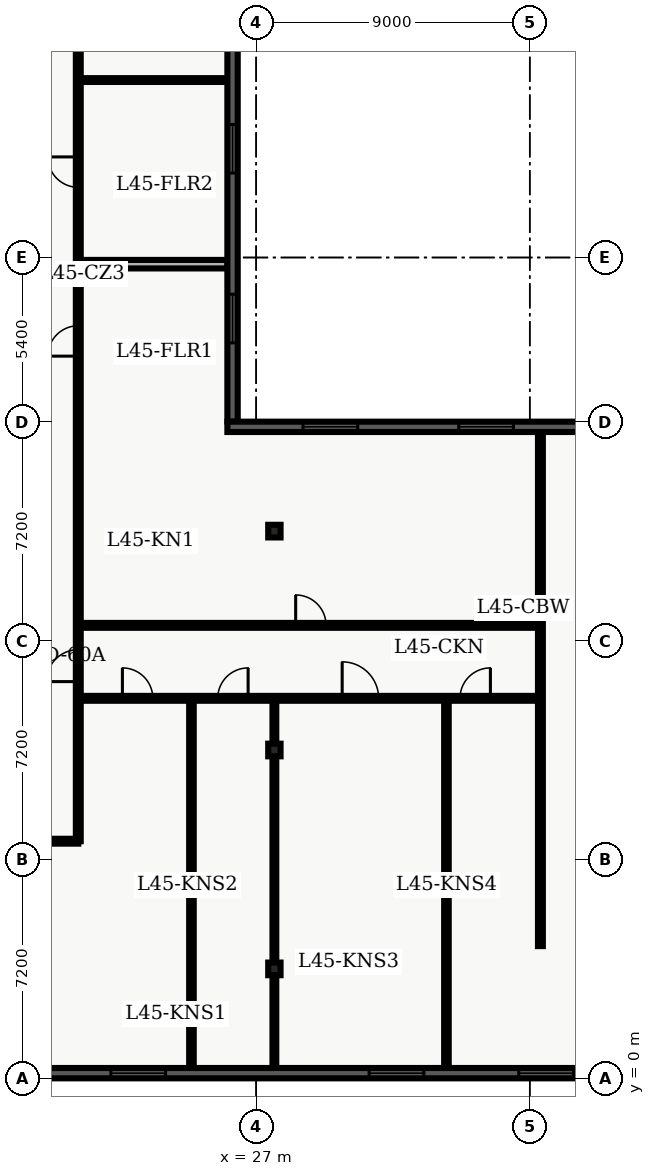
"""IFC4 building model, lengths in metres.
Left out: names, types, materials, properties, quantities, classifications, styles, units other than length and angle.
Written with IfcOpenShell. Run it as: python <this file> out.ifc"""

import sys

from ifc_helpers import new_model, entity, si_unit, converted_unit, direction, frame, origin_with_axes, origin_2d_with_axis, place, context, subcontext, project, spatial, polyline, rectangle, i_section, outline, extrude, element, fill, save


model = new_model("IFC4")
c1 = context("Model", 3, precision=1e-05, world=origin_with_axes(), true_north=direction((0.0, 1.0)))
c2 = subcontext(c1, "Body", "Model", "MODEL_VIEW")
j1 = project(units=[si_unit("LENGTHUNIT", "METRE"), converted_unit("PLANEANGLEUNIT", "DEGREE", entity("IfcPlaneAngleMeasure", 0.017), si_unit("PLANEANGLEUNIT", "RADIAN"), dimensions=[0, 0, 0, 0, 0, 0, 0])], contexts=[c1])
p1 = place(None, origin_with_axes())
s1 = spatial("IfcSite", under=j1, at=p1, CompositionType="ELEMENT")
p2 = place(p1, origin_with_axes())
s2 = spatial("IfcBuilding", under=s1, at=p2, CompositionType="ELEMENT")
p3 = place(p2, frame((0.0, 0.0, 183.6), z_axis=(0.0, 0.0, 1.0), x_axis=(1.0, 0.0, 0.0)))
s3 = spatial("IfcBuildingStorey", under=s2, at=p3, CompositionType="ELEMENT", Elevation=183.6)
for number, where, z_axis, x_axis in (
    (1, (27.6, 3.6, 0.0), (0.0, 0.0, 1.0), (1.0, 0.0, 0.0)),
    (2, (27.6, 10.8, 0.0), (0.0, 0.0, 1.0), (1.0, 0.0, 0.0)),
    (3, (27.6, 18.0, 0.0), (0.0, 0.0, 1.0), (1.0, 0.0, 0.0)),
):
    element("IfcColumn", number, at=place(p3, frame(where, z_axis=z_axis, x_axis=x_axis)), inside=s3, PredefinedType="COLUMN", context=c2, shape_type="SweptSolid", body=[
        extrude(i_section(OverallWidth=0.406, OverallDepth=0.416, WebThickness=0.03, FlangeThickness=0.048, FilletRadius=0.022, at=origin_2d_with_axis()), origin_with_axes(), (0.0, 0.0, 1.0), 3.9),
    ])
p4 = place(p3, frame((2.6, 7.8, 0.0), z_axis=(0.0, 0.0, 1.0), x_axis=(1.0, 0.0, 0.0)))
e4 = element("IfcWall", 4, at=p4, inside=s3, PredefinedType="PARTITIONING", context=c2, shape_type="SweptSolid", body=[
    extrude(outline(polyline([(0.0, -0.08), (18.55, -0.08), (18.55, 0.08), (0.0, 0.08), (0.0, -0.08)])), origin_with_axes(), (0.0, 0.0, 1.0), 2.64),
])
p5 = place(p4, frame((2.569, 0.0, 0.0), z_axis=(0.0, 0.0, 1.0), x_axis=(1.0, 0.0, 0.0)))
e5 = element("IfcOpeningElement", 5, at=p5, cuts=e4, PredefinedType="OPENING", context=c2, shape_type="SweptSolid", body=[
    extrude(rectangle(XDim=1.0, YDim=0.18, at=origin_2d_with_axis()), origin_with_axes(), (0.0, 0.0, 1.0), 2.15),
])
p6 = place(p4, frame((7.534, 0.0, 0.0), z_axis=(0.0, 0.0, 1.0), x_axis=(1.0, 0.0, 0.0)))
e6 = element("IfcOpeningElement", 6, at=p6, cuts=e4, PredefinedType="OPENING", context=c2, shape_type="SweptSolid", body=[
    extrude(rectangle(XDim=1.0, YDim=0.18, at=origin_2d_with_axis()), origin_with_axes(), (0.0, 0.0, 1.0), 2.15),
])
p7 = place(p4, frame((11.293, 0.0, 0.0), z_axis=(0.0, 0.0, 1.0), x_axis=(1.0, 0.0, 0.0)))
e7 = element("IfcOpeningElement", 7, at=p7, cuts=e4, PredefinedType="OPENING", context=c2, shape_type="SweptSolid", body=[
    extrude(rectangle(XDim=1.0, YDim=0.18, at=origin_2d_with_axis()), origin_with_axes(), (0.0, 0.0, 1.0), 2.15),
])
p8 = place(p4, frame((16.142, 0.0, 0.0), z_axis=(0.0, 0.0, 1.0), x_axis=(1.0, 0.0, 0.0)))
e8 = element("IfcOpeningElement", 8, at=p8, cuts=e4, PredefinedType="OPENING", context=c2, shape_type="SweptSolid", body=[
    extrude(rectangle(XDim=1.0, YDim=0.18, at=origin_2d_with_axis()), origin_with_axes(), (0.0, 0.0, 1.0), 2.15),
])
p9 = place(p3, frame((21.15, 7.8, 0.0), z_axis=(0.0, 0.0, 1.0), x_axis=(0.0, 1.0, 0.0)))
e9 = element("IfcWall", 9, at=p9, inside=s3, PredefinedType="PARTITIONING", context=c2, shape_type="SweptSolid", body=[
    extrude(outline(polyline([(0.0, -0.08), (32.7, -0.08), (32.7, 0.08), (0.0, 0.08), (0.0, -0.08)])), origin_with_axes(), (0.0, 0.0, 1.0), 2.64),
])
p10 = place(p9, frame((16.456, 0.0, 0.0), z_axis=(0.0, 0.0, 1.0), x_axis=(1.0, 0.0, 0.0)))
e10 = element("IfcOpeningElement", 10, at=p10, cuts=e9, PredefinedType="OPENING", context=c2, shape_type="SweptSolid", body=[
    extrude(rectangle(XDim=1.0, YDim=0.18, at=origin_2d_with_axis()), origin_with_axes(), (0.0, 0.0, 1.0), 2.15),
])
p11 = place(p9, frame((22.009, 0.0, 0.0), z_axis=(0.0, 0.0, 1.0), x_axis=(1.0, 0.0, 0.0)))
e11 = element("IfcOpeningElement", 11, at=p11, cuts=e9, PredefinedType="OPENING", context=c2, shape_type="SweptSolid", body=[
    extrude(rectangle(XDim=1.0, YDim=0.18, at=origin_2d_with_axis()), origin_with_axes(), (0.0, 0.0, 1.0), 2.15),
])
p12 = place(p9, frame((28.803, 0.0, 0.0), z_axis=(0.0, 0.0, 1.0), x_axis=(1.0, 0.0, 0.0)))
e12 = element("IfcOpeningElement", 12, at=p12, cuts=e9, PredefinedType="OPENING", context=c2, shape_type="SweptSolid", body=[
    extrude(rectangle(XDim=1.0, YDim=0.18, at=origin_2d_with_axis()), origin_with_axes(), (0.0, 0.0, 1.0), 2.15),
])
p13 = place(p9, frame((5.775, 0.0, 0.0), z_axis=(0.0, 0.0, 1.0), x_axis=(1.0, 0.0, 0.0)))
e13 = element("IfcOpeningElement", 13, at=p13, cuts=e9, PredefinedType="OPENING", context=c2, shape_type="SweptSolid", body=[
    extrude(rectangle(XDim=1.05, YDim=0.18, at=origin_2d_with_axis()), origin_with_axes(), (0.0, 0.0, 1.0), 2.15),
])
p14 = place(p3, frame((21.3, 26.781, 0.0), z_axis=(0.0, 0.0, 1.0), x_axis=(1.0, 0.0, 0.0)))
e14 = element("IfcWall", 14, at=p14, inside=s3, PredefinedType="PARTITIONING", context=c2, shape_type="SweptSolid", body=[
    extrude(outline(polyline([(0.0, -0.14), (4.759, -0.14), (4.759, 0.14), (0.0, 0.14), (0.0, -0.14)])), origin_with_axes(), (0.0, 0.0, 1.0), 2.64),
])
p15 = place(p3, frame((21.3, 32.837, 0.0), z_axis=(0.0, 0.0, 1.0), x_axis=(1.0, 0.0, 0.0)))
e15 = element("IfcWall", 15, at=p15, inside=s3, PredefinedType="PARTITIONING", context=c2, shape_type="SweptSolid", body=[
    extrude(outline(polyline([(0.0, -0.062), (4.759, -0.062), (4.759, 0.062), (0.0, 0.062), (0.0, -0.062)])), origin_with_axes(), (0.0, 0.0, 1.0), 2.64),
])
p16 = place(p3, frame((21.15, 12.5, 0.0), z_axis=(0.0, 0.0, 1.0), x_axis=(1.0, 0.0, 0.0)))
e16 = element("IfcWall", 16, at=p16, inside=s3, PredefinedType="PARTITIONING", context=c2, shape_type="SweptSolid", body=[
    extrude(outline(polyline([(0.0, -0.08), (15.2, -0.08), (15.2, 0.08), (0.0, 0.08), (0.0, -0.08)])), origin_with_axes(), (0.0, 0.0, 1.0), 2.64),
])
p17 = place(p16, frame((1.951, 0.0, 0.0), z_axis=(0.0, 0.0, 1.0), x_axis=(1.0, 0.0, 0.0)))
e17 = element("IfcOpeningElement", 17, at=p17, cuts=e16, PredefinedType="OPENING", context=c2, shape_type="SweptSolid", body=[
    extrude(rectangle(XDim=1.0, YDim=0.18, at=origin_2d_with_axis()), origin_with_axes(), (0.0, 0.0, 1.0), 2.15),
])
p18 = place(p16, frame((5.086, 0.0, 0.0), z_axis=(0.0, 0.0, 1.0), x_axis=(1.0, 0.0, 0.0)))
e18 = element("IfcOpeningElement", 18, at=p18, cuts=e16, PredefinedType="OPENING", context=c2, shape_type="SweptSolid", body=[
    extrude(rectangle(XDim=1.0, YDim=0.18, at=origin_2d_with_axis()), origin_with_axes(), (0.0, 0.0, 1.0), 2.15),
])
p19 = place(p16, frame((9.28, 0.0, 0.0), z_axis=(0.0, 0.0, 1.0), x_axis=(1.0, 0.0, 0.0)))
e19 = element("IfcOpeningElement", 19, at=p19, cuts=e16, PredefinedType="OPENING", context=c2, shape_type="SweptSolid", body=[
    extrude(rectangle(XDim=1.2, YDim=0.18, at=origin_2d_with_axis()), origin_with_axes(), (0.0, 0.0, 1.0), 2.2),
])
p20 = place(p16, frame((13.055, 0.0, 0.0), z_axis=(0.0, 0.0, 1.0), x_axis=(1.0, 0.0, 0.0)))
e20 = element("IfcOpeningElement", 20, at=p20, cuts=e16, PredefinedType="OPENING", context=c2, shape_type="SweptSolid", body=[
    extrude(rectangle(XDim=1.0, YDim=0.18, at=origin_2d_with_axis()), origin_with_axes(), (0.0, 0.0, 1.0), 2.15),
])
p21 = place(p3, frame((21.15, 14.9, 0.0), z_axis=(0.0, 0.0, 1.0), x_axis=(1.0, 0.0, 0.0)))
e21 = element("IfcWall", 21, at=p21, inside=s3, PredefinedType="PARTITIONING", context=c2, shape_type="SweptSolid", body=[
    extrude(outline(polyline([(0.0, -0.08), (15.2, -0.08), (15.2, 0.08), (0.0, 0.08), (0.0, -0.08)])), origin_with_axes(), (0.0, 0.0, 1.0), 2.64),
])
p22 = place(p21, frame((7.65, 0.0, 0.0), z_axis=(0.0, 0.0, 1.0), x_axis=(1.0, 0.0, 0.0)))
e22 = element("IfcOpeningElement", 22, at=p22, cuts=e21, PredefinedType="OPENING", context=c2, shape_type="SweptSolid", body=[
    extrude(rectangle(XDim=1.0, YDim=0.18, at=origin_2d_with_axis()), origin_with_axes(), (0.0, 0.0, 1.0), 2.15),
])
p23 = place(p3, frame((36.35, 4.35, 0.0), z_axis=(0.0, 0.0, 1.0), x_axis=(0.0, 1.0, 0.0)))
e23 = element("IfcWall", 23, at=p23, inside=s3, PredefinedType="PARTITIONING", context=c2, shape_type="SweptSolid", body=[
    extrude(outline(polyline([(0.0, -0.08), (16.95, -0.08), (16.95, 0.08), (0.0, 0.08), (0.0, -0.08)])), origin_with_axes(), (0.0, 0.0, 1.0), 2.64),
])
p24 = place(p3, frame((24.872, 0.335, 0.0), z_axis=(0.0, 0.0, 1.0), x_axis=(0.0, 1.0, 0.0)))
e24 = element("IfcWall", 24, at=p24, inside=s3, PredefinedType="PARTITIONING", context=c2, shape_type="SweptSolid", body=[
    extrude(outline(polyline([(0.0, -0.075), (12.045, -0.075), (12.045, 0.075), (0.0, 0.075), (0.0, -0.075)])), origin_with_axes(), (0.0, 0.0, 1.0), 2.64),
])
p25 = place(p3, frame((27.6, 0.335, 0.0), z_axis=(0.0, 0.0, 1.0), x_axis=(0.0, 1.0, 0.0)))
e25 = element("IfcWall", 25, at=p25, inside=s3, PredefinedType="PARTITIONING", context=c2, shape_type="SweptSolid", body=[
    extrude(outline(polyline([(0.0, -0.062), (12.045, -0.062), (12.045, 0.062), (0.0, 0.062), (0.0, -0.062)])), origin_with_axes(), (0.0, 0.0, 1.0), 2.64),
])
p26 = place(p3, frame((33.259, 0.335, 0.0), z_axis=(0.0, 0.0, 1.0), x_axis=(0.0, 1.0, 0.0)))
e26 = element("IfcWall", 26, at=p26, inside=s3, PredefinedType="PARTITIONING", context=c2, shape_type="SweptSolid", body=[
    extrude(outline(polyline([(0.0, -0.075), (12.045, -0.075), (12.045, 0.075), (0.0, 0.075), (0.0, -0.075)])), origin_with_axes(), (0.0, 0.0, 1.0), 2.64),
])
p27 = place(p3, frame((57.26, 0.17, 0.0), z_axis=(0.0, 0.0, 1.0), x_axis=(-1.0, 0.0, 0.0)))
e27 = element("IfcWall", 27, at=p27, inside=s3, PredefinedType="SOLIDWALL", context=c2, shape_type="SweptSolid", body=[
    extrude(outline(polyline([(0.0, -0.17), (54.86, -0.17), (54.86, 0.17), (0.0, 0.17), (0.0, -0.17)])), origin_with_axes(), (0.0, 0.0, 1.0), 3.6),
])
p28 = place(p27, frame((2.836, 0.0, 0.45), z_axis=(0.0, 0.0, 1.0), x_axis=(1.0, 0.0, 0.0)))
e28 = element("IfcOpeningElement", 28, at=p28, cuts=e27, PredefinedType="OPENING", context=c2, shape_type="SweptSolid", body=[
    extrude(rectangle(XDim=1.8, YDim=0.36, at=origin_2d_with_axis()), origin_with_axes(), (0.0, 0.0, 1.0), 2.1),
])
p29 = place(p27, frame((7.307, 0.0, 0.45), z_axis=(0.0, 0.0, 1.0), x_axis=(1.0, 0.0, 0.0)))
e29 = element("IfcOpeningElement", 29, at=p29, cuts=e27, PredefinedType="OPENING", context=c2, shape_type="SweptSolid", body=[
    extrude(rectangle(XDim=1.8, YDim=0.36, at=origin_2d_with_axis()), origin_with_axes(), (0.0, 0.0, 1.0), 2.1),
])
p30 = place(p27, frame((11.779, 0.0, 0.45), z_axis=(0.0, 0.0, 1.0), x_axis=(1.0, 0.0, 0.0)))
e30 = element("IfcOpeningElement", 30, at=p30, cuts=e27, PredefinedType="OPENING", context=c2, shape_type="SweptSolid", body=[
    extrude(rectangle(XDim=1.8, YDim=0.36, at=origin_2d_with_axis()), origin_with_axes(), (0.0, 0.0, 1.0), 2.1),
])
p31 = place(p27, frame((16.251, 0.0, 0.45), z_axis=(0.0, 0.0, 1.0), x_axis=(1.0, 0.0, 0.0)))
e31 = element("IfcOpeningElement", 31, at=p31, cuts=e27, PredefinedType="OPENING", context=c2, shape_type="SweptSolid", body=[
    extrude(rectangle(XDim=1.8, YDim=0.36, at=origin_2d_with_axis()), origin_with_axes(), (0.0, 0.0, 1.0), 2.1),
])
p32 = place(p27, frame((20.723, 0.0, 0.45), z_axis=(0.0, 0.0, 1.0), x_axis=(1.0, 0.0, 0.0)))
e32 = element("IfcOpeningElement", 32, at=p32, cuts=e27, PredefinedType="OPENING", context=c2, shape_type="SweptSolid", body=[
    extrude(rectangle(XDim=1.8, YDim=0.36, at=origin_2d_with_axis()), origin_with_axes(), (0.0, 0.0, 1.0), 2.1),
])
p33 = place(p27, frame((25.644, 0.0, 0.45), z_axis=(0.0, 0.0, 1.0), x_axis=(1.0, 0.0, 0.0)))
e33 = element("IfcOpeningElement", 33, at=p33, cuts=e27, PredefinedType="OPENING", context=c2, shape_type="SweptSolid", body=[
    extrude(rectangle(XDim=1.8, YDim=0.36, at=origin_2d_with_axis()), origin_with_axes(), (0.0, 0.0, 1.0), 2.1),
])
p34 = place(p27, frame((34.138, 0.0, 0.45), z_axis=(0.0, 0.0, 1.0), x_axis=(1.0, 0.0, 0.0)))
e34 = element("IfcOpeningElement", 34, at=p34, cuts=e27, PredefinedType="OPENING", context=c2, shape_type="SweptSolid", body=[
    extrude(rectangle(XDim=1.8, YDim=0.36, at=origin_2d_with_axis()), origin_with_axes(), (0.0, 0.0, 1.0), 2.1),
])
p35 = place(p27, frame((38.609, 0.0, 0.45), z_axis=(0.0, 0.0, 1.0), x_axis=(1.0, 0.0, 0.0)))
e35 = element("IfcOpeningElement", 35, at=p35, cuts=e27, PredefinedType="OPENING", context=c2, shape_type="SweptSolid", body=[
    extrude(rectangle(XDim=1.8, YDim=0.36, at=origin_2d_with_axis()), origin_with_axes(), (0.0, 0.0, 1.0), 2.1),
])
p36 = place(p27, frame((43.081, 0.0, 0.45), z_axis=(0.0, 0.0, 1.0), x_axis=(1.0, 0.0, 0.0)))
e36 = element("IfcOpeningElement", 36, at=p36, cuts=e27, PredefinedType="OPENING", context=c2, shape_type="SweptSolid", body=[
    extrude(rectangle(XDim=1.8, YDim=0.36, at=origin_2d_with_axis()), origin_with_axes(), (0.0, 0.0, 1.0), 2.1),
])
p37 = place(p27, frame((52.024, 0.0, 0.45), z_axis=(0.0, 0.0, 1.0), x_axis=(1.0, 0.0, 0.0)))
e37 = element("IfcOpeningElement", 37, at=p37, cuts=e27, PredefinedType="OPENING", context=c2, shape_type="SweptSolid", body=[
    extrude(rectangle(XDim=1.8, YDim=0.36, at=origin_2d_with_axis()), origin_with_axes(), (0.0, 0.0, 1.0), 2.1),
])
p38 = place(p3, frame((26.224, 45.14, 0.0), z_axis=(0.0, 0.0, 1.0), x_axis=(0.0, -1.0, 0.0)))
e38 = element("IfcWall", 38, at=p38, inside=s3, PredefinedType="SOLIDWALL", context=c2, shape_type="SweptSolid", body=[
    extrude(outline(polyline([(0.0, -0.17), (23.54, -0.17), (23.54, 0.17), (0.0, 0.17), (0.0, -0.17)])), origin_with_axes(), (0.0, 0.0, 1.0), 3.6),
])
p39 = place(p38, frame((2.943, 0.0, 0.45), z_axis=(0.0, 0.0, 1.0), x_axis=(1.0, 0.0, 0.0)))
e39 = element("IfcOpeningElement", 39, at=p39, cuts=e38, PredefinedType="OPENING", context=c2, shape_type="SweptSolid", body=[
    extrude(rectangle(XDim=1.6, YDim=0.36, at=origin_2d_with_axis()), origin_with_axes(), (0.0, 0.0, 1.0), 2.2),
])
p40 = place(p38, frame((8.977, 0.0, 0.45), z_axis=(0.0, 0.0, 1.0), x_axis=(1.0, 0.0, 0.0)))
e40 = element("IfcOpeningElement", 40, at=p40, cuts=e38, PredefinedType="OPENING", context=c2, shape_type="SweptSolid", body=[
    extrude(rectangle(XDim=1.6, YDim=0.36, at=origin_2d_with_axis()), origin_with_axes(), (0.0, 0.0, 1.0), 2.2),
])
p41 = place(p38, frame((14.562, 0.0, 0.45), z_axis=(0.0, 0.0, 1.0), x_axis=(1.0, 0.0, 0.0)))
e41 = element("IfcOpeningElement", 41, at=p41, cuts=e38, PredefinedType="OPENING", context=c2, shape_type="SweptSolid", body=[
    extrude(rectangle(XDim=1.6, YDim=0.36, at=origin_2d_with_axis()), origin_with_axes(), (0.0, 0.0, 1.0), 2.2),
])
p42 = place(p38, frame((20.148, 0.0, 0.45), z_axis=(0.0, 0.0, 1.0), x_axis=(1.0, 0.0, 0.0)))
e42 = element("IfcOpeningElement", 42, at=p42, cuts=e38, PredefinedType="OPENING", context=c2, shape_type="SweptSolid", body=[
    extrude(rectangle(XDim=1.6, YDim=0.36, at=origin_2d_with_axis()), origin_with_axes(), (0.0, 0.0, 1.0), 2.2),
])
p43 = place(p3, frame((26.054, 21.43, 0.0), z_axis=(0.0, 0.0, 1.0), x_axis=(1.0, 0.0, 0.0)))
e43 = element("IfcWall", 43, at=p43, inside=s3, PredefinedType="SOLIDWALL", context=c2, shape_type="SweptSolid", body=[
    extrude(outline(polyline([(0.0, -0.17), (12.346, -0.17), (12.346, 0.17), (0.0, 0.17), (0.0, -0.17)])), origin_with_axes(), (0.0, 0.0, 1.0), 3.6),
])
p44 = place(p43, frame((3.387, 0.0, 0.45), z_axis=(0.0, 0.0, 1.0), x_axis=(1.0, 0.0, 0.0)))
e44 = element("IfcOpeningElement", 44, at=p44, cuts=e43, PredefinedType="OPENING", context=c2, shape_type="SweptSolid", body=[
    extrude(rectangle(XDim=1.8, YDim=0.36, at=origin_2d_with_axis()), origin_with_axes(), (0.0, 0.0, 1.0), 2.1),
])
p45 = place(p43, frame((8.509, 0.0, 0.45), z_axis=(0.0, 0.0, 1.0), x_axis=(1.0, 0.0, 0.0)))
e45 = element("IfcOpeningElement", 45, at=p45, cuts=e43, PredefinedType="OPENING", context=c2, shape_type="SweptSolid", body=[
    extrude(rectangle(XDim=1.8, YDim=0.36, at=origin_2d_with_axis()), origin_with_axes(), (0.0, 0.0, 1.0), 2.1),
])
p46 = place(p9, frame((16.456, 0.0, 0.0), z_axis=(0.0, 0.0, 1.0), x_axis=(1.0, 0.0, 0.0)))
e46 = element("IfcDoor", 46, at=p46, inside=s3, OperationType="SINGLE_SWING_LEFT", PredefinedType="DOOR", context=c2, shape_type="SweptSolid", body=[
    extrude(rectangle(XDim=1.0, YDim=0.09, at=origin_2d_with_axis()), origin_with_axes(), (0.0, 0.0, 1.0), 2.15),
])
fill(e10, e46)
p47 = place(p9, frame((22.009, 0.0, 0.0), z_axis=(0.0, 0.0, 1.0), x_axis=(1.0, 0.0, 0.0)))
e47 = element("IfcDoor", 47, at=p47, inside=s3, OperationType="SINGLE_SWING_RIGHT", PredefinedType="DOOR", context=c2, shape_type="SweptSolid", body=[
    extrude(rectangle(XDim=1.0, YDim=0.09, at=origin_2d_with_axis()), origin_with_axes(), (0.0, 0.0, 1.0), 2.15),
])
fill(e11, e47)
p48 = place(p9, frame((5.775, 0.0, 0.0), z_axis=(0.0, 0.0, 1.0), x_axis=(1.0, 0.0, 0.0)))
e48 = element("IfcDoor", 48, at=p48, inside=s3, OperationType="SINGLE_SWING_LEFT", PredefinedType="DOOR", context=c2, shape_type="SweptSolid", body=[
    extrude(rectangle(XDim=1.05, YDim=0.09, at=origin_2d_with_axis()), origin_with_axes(), (0.0, 0.0, 1.0), 2.15),
])
fill(e13, e48)
p49 = place(p16, frame((1.951, 0.0, 0.0), z_axis=(0.0, 0.0, 1.0), x_axis=(1.0, 0.0, 0.0)))
e49 = element("IfcDoor", 49, at=p49, inside=s3, OperationType="SINGLE_SWING_LEFT", PredefinedType="DOOR", context=c2, shape_type="SweptSolid", body=[
    extrude(rectangle(XDim=1.0, YDim=0.09, at=origin_2d_with_axis()), origin_with_axes(), (0.0, 0.0, 1.0), 2.15),
])
fill(e17, e49)
p50 = place(p16, frame((5.086, 0.0, 0.0), z_axis=(0.0, 0.0, 1.0), x_axis=(1.0, 0.0, 0.0)))
e50 = element("IfcDoor", 50, at=p50, inside=s3, OperationType="SINGLE_SWING_RIGHT", PredefinedType="DOOR", context=c2, shape_type="SweptSolid", body=[
    extrude(rectangle(XDim=1.0, YDim=0.09, at=origin_2d_with_axis()), origin_with_axes(), (0.0, 0.0, 1.0), 2.15),
])
fill(e18, e50)
p51 = place(p16, frame((9.28, 0.0, 0.0), z_axis=(0.0, 0.0, 1.0), x_axis=(1.0, 0.0, 0.0)))
e51 = element("IfcDoor", 51, at=p51, inside=s3, OperationType="SINGLE_SWING_LEFT", PredefinedType="DOOR", context=c2, shape_type="SweptSolid", body=[
    extrude(rectangle(XDim=1.2, YDim=0.09, at=origin_2d_with_axis()), origin_with_axes(), (0.0, 0.0, 1.0), 2.2),
])
fill(e19, e51)
p52 = place(p16, frame((13.055, 0.0, 0.0), z_axis=(0.0, 0.0, 1.0), x_axis=(1.0, 0.0, 0.0)))
e52 = element("IfcDoor", 52, at=p52, inside=s3, OperationType="SINGLE_SWING_RIGHT", PredefinedType="DOOR", context=c2, shape_type="SweptSolid", body=[
    extrude(rectangle(XDim=1.0, YDim=0.09, at=origin_2d_with_axis()), origin_with_axes(), (0.0, 0.0, 1.0), 2.15),
])
fill(e20, e52)
p53 = place(p21, frame((7.65, 0.0, 0.0), z_axis=(0.0, 0.0, 1.0), x_axis=(1.0, 0.0, 0.0)))
e53 = element("IfcDoor", 53, at=p53, inside=s3, OperationType="SINGLE_SWING_LEFT", PredefinedType="DOOR", context=c2, shape_type="SweptSolid", body=[
    extrude(rectangle(XDim=1.0, YDim=0.09, at=origin_2d_with_axis()), origin_with_axes(), (0.0, 0.0, 1.0), 2.15),
])
fill(e22, e53)
p54 = place(p27, frame((20.723, 0.0, 0.45), z_axis=(0.0, 0.0, 1.0), x_axis=(1.0, 0.0, 0.0)))
e54 = element("IfcWindow", 54, at=p54, inside=s3, PredefinedType="WINDOW", context=c2, shape_type="SweptSolid", body=[
    extrude(rectangle(XDim=1.8, YDim=0.09, at=origin_2d_with_axis()), origin_with_axes(), (0.0, 0.0, 1.0), 2.1),
])
fill(e32, e54)
p55 = place(p27, frame((25.644, 0.0, 0.45), z_axis=(0.0, 0.0, 1.0), x_axis=(1.0, 0.0, 0.0)))
e55 = element("IfcWindow", 55, at=p55, inside=s3, PredefinedType="WINDOW", context=c2, shape_type="SweptSolid", body=[
    extrude(rectangle(XDim=1.8, YDim=0.09, at=origin_2d_with_axis()), origin_with_axes(), (0.0, 0.0, 1.0), 2.1),
])
fill(e33, e55)
p56 = place(p27, frame((34.138, 0.0, 0.45), z_axis=(0.0, 0.0, 1.0), x_axis=(1.0, 0.0, 0.0)))
e56 = element("IfcWindow", 56, at=p56, inside=s3, PredefinedType="WINDOW", context=c2, shape_type="SweptSolid", body=[
    extrude(rectangle(XDim=1.8, YDim=0.09, at=origin_2d_with_axis()), origin_with_axes(), (0.0, 0.0, 1.0), 2.1),
])
fill(e34, e56)
p57 = place(p38, frame((14.562, 0.0, 0.45), z_axis=(0.0, 0.0, 1.0), x_axis=(1.0, 0.0, 0.0)))
e57 = element("IfcWindow", 57, at=p57, inside=s3, PredefinedType="WINDOW", context=c2, shape_type="SweptSolid", body=[
    extrude(rectangle(XDim=1.6, YDim=0.09, at=origin_2d_with_axis()), origin_with_axes(), (0.0, 0.0, 1.0), 2.2),
])
fill(e41, e57)
p58 = place(p38, frame((20.148, 0.0, 0.45), z_axis=(0.0, 0.0, 1.0), x_axis=(1.0, 0.0, 0.0)))
e58 = element("IfcWindow", 58, at=p58, inside=s3, PredefinedType="WINDOW", context=c2, shape_type="SweptSolid", body=[
    extrude(rectangle(XDim=1.6, YDim=0.09, at=origin_2d_with_axis()), origin_with_axes(), (0.0, 0.0, 1.0), 2.2),
])
fill(e42, e58)
p59 = place(p43, frame((3.387, 0.0, 0.45), z_axis=(0.0, 0.0, 1.0), x_axis=(1.0, 0.0, 0.0)))
e59 = element("IfcWindow", 59, at=p59, inside=s3, PredefinedType="WINDOW", context=c2, shape_type="SweptSolid", body=[
    extrude(rectangle(XDim=1.8, YDim=0.09, at=origin_2d_with_axis()), origin_with_axes(), (0.0, 0.0, 1.0), 2.1),
])
fill(e44, e59)
p60 = place(p43, frame((8.509, 0.0, 0.45), z_axis=(0.0, 0.0, 1.0), x_axis=(1.0, 0.0, 0.0)))
e60 = element("IfcWindow", 60, at=p60, inside=s3, PredefinedType="WINDOW", context=c2, shape_type="SweptSolid", body=[
    extrude(rectangle(XDim=1.8, YDim=0.09, at=origin_2d_with_axis()), origin_with_axes(), (0.0, 0.0, 1.0), 2.1),
])
fill(e45, e60)
save(model, sys.argv[1])
